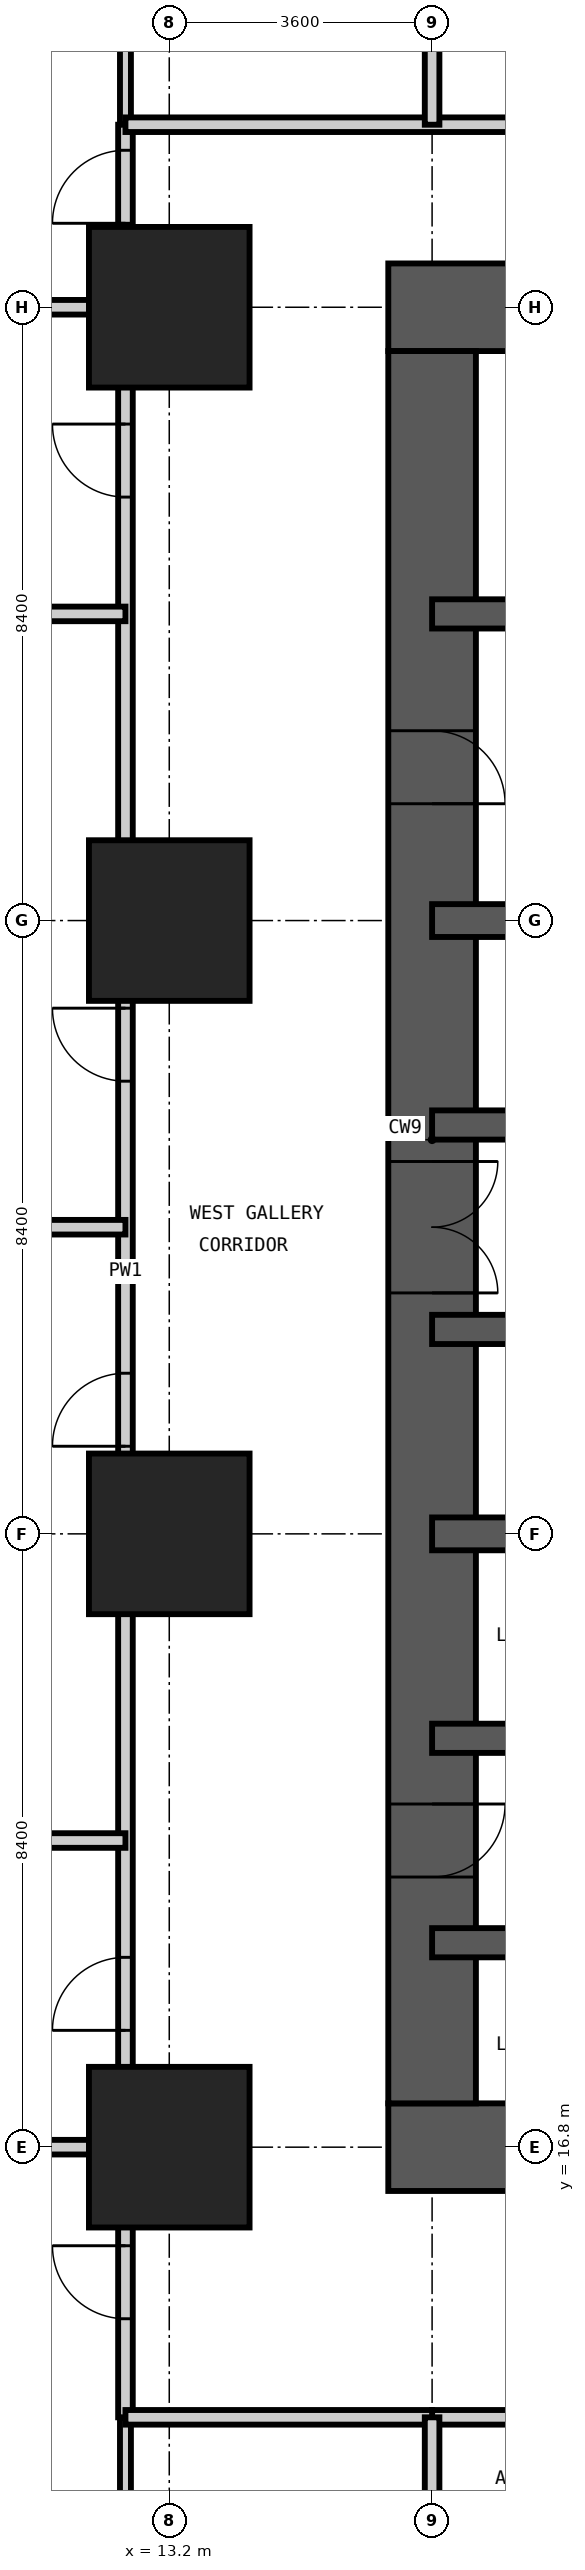
"""IFC4 building model, lengths in metres.
Left out: names, types, materials, properties, quantities, classifications, styles, units other than length and angle.
Written with IfcOpenShell. Run it as: python <this file> out.ifc"""

import sys

from ifc_helpers import new_model, si_unit, direction, frame, frame_2d, origin, origin_2d, place, context, subcontext, project, spatial, rectangle, extrude, element, fill, save


model = new_model("IFC4")
c1 = context("Model", 3, precision=1e-05, world=origin(), true_north=direction((0.0, 1.0)))
c2 = subcontext(c1, "Body", "Model", "MODEL_VIEW")
j1 = project(units=[si_unit("LENGTHUNIT", "METRE"), si_unit("PLANEANGLEUNIT", "RADIAN")], contexts=[c1])
p1 = place(None, origin())
s1 = spatial("IfcSite", under=j1, at=p1, CompositionType="ELEMENT")
p2 = place(p1, origin())
s2 = spatial("IfcBuilding", under=s1, at=p2, CompositionType="ELEMENT")
p3 = place(p2, frame((0.0, 0.0, 144.0)))
s3 = spatial("IfcBuildingStorey", under=s2, at=p3, CompositionType="ELEMENT", Elevation=144.0)
for number, where, z_axis, x_axis in (
    (1, (13.2, 16.8, -0.35), (0.0, 0.0, 1.0), (1.0, 0.0, 0.0)),
    (2, (13.2, 25.2, -0.35), (0.0, 0.0, 1.0), (1.0, 0.0, 0.0)),
    (3, (13.2, 33.6, -0.35), (0.0, 0.0, 1.0), (1.0, 0.0, 0.0)),
    (4, (13.2, 42.0, -0.35), (0.0, 0.0, 1.0), (1.0, 0.0, 0.0)),
):
    element("IfcColumn", number, at=place(p3, frame(where, z_axis=z_axis, x_axis=x_axis)), inside=s3, PredefinedType="COLUMN", context=c2, shape_type="SweptSolid", body=[
        extrude(rectangle(XDim=2.2, YDim=2.2, at=origin_2d()), origin(), (0.0, 0.0, 1.0), 3.6),
    ])
p4 = place(p3, frame((16.2, 16.8, -0.35), z_axis=(0.0, 0.0, 1.0), x_axis=(1.0, 0.0, 0.0)))
e5 = element("IfcWall", 5, at=p4, inside=s3, PredefinedType="SHEAR", context=c2, shape_type="SweptSolid", body=[
    extrude(rectangle(XDim=26.4, YDim=1.2, at=frame_2d((13.2, 0.0))), origin(), (0.0, 0.0, 1.0), 3.6),
])
p5 = place(p4, frame((12.7, 0.0, 0.35)))
e6 = element("IfcOpeningElement", 6, at=p5, cuts=e5, PredefinedType="OPENING", context=c2, shape_type="SweptSolid", body=[
    extrude(rectangle(XDim=1.0, YDim=2.1, at=frame_2d((0.5, 1.05))), frame((0.0, 0.61, 0.0), z_axis=(0.0, -1.0, 0.0), x_axis=(1.0, 0.0, 0.0)), (0.0, 0.0, 1.0), 1.22),
])
p6 = place(p4, frame((19.0, 0.0, 0.35)))
e7 = element("IfcOpeningElement", 7, at=p6, cuts=e5, PredefinedType="OPENING", context=c2, shape_type="SweptSolid", body=[
    extrude(rectangle(XDim=1.0, YDim=2.1, at=frame_2d((0.5, 1.05))), frame((0.0, 0.61, 0.0), z_axis=(0.0, -1.0, 0.0), x_axis=(1.0, 0.0, 0.0)), (0.0, 0.0, 1.0), 1.22),
])
p7 = place(p3, frame((42.6, 42.0, -0.35), z_axis=(0.0, 0.0, 1.0), x_axis=(-1.0, 0.0, 0.0)))
e8 = element("IfcWall", 8, at=p7, inside=s3, PredefinedType="SHEAR", context=c2, shape_type="SweptSolid", body=[
    extrude(rectangle(XDim=26.4, YDim=1.2, at=frame_2d((13.2, 0.0))), origin(), (0.0, 0.0, 1.0), 3.6),
])
p8 = place(p7, frame((21.1, 0.0, 0.35)))
e9 = element("IfcOpeningElement", 9, at=p8, cuts=e8, PredefinedType="OPENING", context=c2, shape_type="SweptSolid", body=[
    extrude(rectangle(XDim=1.0, YDim=2.1, at=frame_2d((0.5, 1.05))), frame((0.0, 0.61, 0.0), z_axis=(0.0, -1.0, 0.0), x_axis=(1.0, 0.0, 0.0)), (0.0, 0.0, 1.0), 1.22),
])
p9 = place(p7, frame((10.5, 0.0, 0.35)))
e10 = element("IfcOpeningElement", 10, at=p9, cuts=e8, PredefinedType="OPENING", context=c2, shape_type="SweptSolid", body=[
    extrude(rectangle(XDim=1.2, YDim=2.2, at=frame_2d((0.6, 1.1))), frame((0.0, 0.61, 0.0), z_axis=(0.0, -1.0, 0.0), x_axis=(1.0, 0.0, 0.0)), (0.0, 0.0, 1.0), 1.22),
])
p10 = place(p3, frame((16.8, 41.4, -0.35), z_axis=(0.0, 0.0, 1.0), x_axis=(0.0, -1.0, 0.0)))
e11 = element("IfcWall", 11, at=p10, inside=s3, PredefinedType="SHEAR", context=c2, shape_type="SweptSolid", body=[
    extrude(rectangle(XDim=24.0, YDim=1.2, at=frame_2d((12.0, 0.0))), origin(), (0.0, 0.0, 1.0), 3.6),
])
p11 = place(p10, frame((11.1, 0.0, 0.35)))
e12 = element("IfcOpeningElement", 12, at=p11, cuts=e11, PredefinedType="OPENING", context=c2, shape_type="SweptSolid", body=[
    extrude(rectangle(XDim=1.8, YDim=2.2, at=frame_2d((0.9, 1.1))), frame((0.0, 0.61, 0.0), z_axis=(0.0, -1.0, 0.0), x_axis=(1.0, 0.0, 0.0)), (0.0, 0.0, 1.0), 1.22),
])
p12 = place(p10, frame((19.9, 0.0, 0.35)))
e13 = element("IfcOpeningElement", 13, at=p12, cuts=e11, PredefinedType="OPENING", context=c2, shape_type="SweptSolid", body=[
    extrude(rectangle(XDim=1.0, YDim=2.1, at=frame_2d((0.5, 1.05))), frame((0.0, 0.61, 0.0), z_axis=(0.0, -1.0, 0.0), x_axis=(1.0, 0.0, 0.0)), (0.0, 0.0, 1.0), 1.22),
])
p13 = place(p10, frame((5.2, 0.0, 0.35)))
e14 = element("IfcOpeningElement", 14, at=p13, cuts=e11, PredefinedType="OPENING", context=c2, shape_type="SweptSolid", body=[
    extrude(rectangle(XDim=1.0, YDim=2.1, at=frame_2d((0.5, 1.05))), frame((0.0, 0.61, 0.0), z_axis=(0.0, -1.0, 0.0), x_axis=(1.0, 0.0, 0.0)), (0.0, 0.0, 1.0), 1.22),
])
for number, where, z_axis, x_axis in (
    (15, (16.8, 19.6, -0.35), (0.0, 0.0, 1.0), (1.0, 0.0, 0.0)),
    (16, (16.8, 22.4, -0.35), (0.0, 0.0, 1.0), (1.0, 0.0, 0.0)),
):
    element("IfcWall", number, at=place(p3, frame(where, z_axis=z_axis, x_axis=x_axis)), inside=s3, PredefinedType="SHEAR", context=c2, shape_type="SweptSolid", body=[
        extrude(rectangle(XDim=8.4, YDim=0.4, at=frame_2d((4.2, 0.0))), origin(), (0.0, 0.0, 1.0), 3.6),
    ])
p14 = place(p3, frame((16.8, 28.0, -0.35), z_axis=(0.0, 0.0, 1.0), x_axis=(1.0, 0.0, 0.0)))
e17 = element("IfcWall", 17, at=p14, inside=s3, PredefinedType="SHEAR", context=c2, shape_type="SweptSolid", body=[
    extrude(rectangle(XDim=8.4, YDim=0.4, at=frame_2d((4.2, 0.0))), origin(), (0.0, 0.0, 1.0), 3.6),
])
p15 = place(p14, frame((1.55, 0.0, 0.35)))
e18 = element("IfcOpeningElement", 18, at=p15, cuts=e17, PredefinedType="OPENING", context=c2, shape_type="SweptSolid", body=[
    extrude(rectangle(XDim=1.1, YDim=2.2, at=frame_2d((0.55, 1.1))), frame((0.0, 0.21, 0.0), z_axis=(0.0, -1.0, 0.0), x_axis=(1.0, 0.0, 0.0)), (0.0, 0.0, 1.0), 0.42),
])
p16 = place(p14, frame((5.75, 0.0, 0.35)))
e19 = element("IfcOpeningElement", 19, at=p16, cuts=e17, PredefinedType="OPENING", context=c2, shape_type="SweptSolid", body=[
    extrude(rectangle(XDim=1.1, YDim=2.2, at=frame_2d((0.55, 1.1))), frame((0.0, 0.21, 0.0), z_axis=(0.0, -1.0, 0.0), x_axis=(1.0, 0.0, 0.0)), (0.0, 0.0, 1.0), 0.42),
])
p17 = place(p3, frame((16.8, 30.8, -0.35), z_axis=(0.0, 0.0, 1.0), x_axis=(1.0, 0.0, 0.0)))
e20 = element("IfcWall", 20, at=p17, inside=s3, PredefinedType="SHEAR", context=c2, shape_type="SweptSolid", body=[
    extrude(rectangle(XDim=8.4, YDim=0.4, at=frame_2d((4.2, 0.0))), origin(), (0.0, 0.0, 1.0), 3.6),
])
p18 = place(p17, frame((1.55, 0.0, 0.35)))
e21 = element("IfcOpeningElement", 21, at=p18, cuts=e20, PredefinedType="OPENING", context=c2, shape_type="SweptSolid", body=[
    extrude(rectangle(XDim=1.1, YDim=2.2, at=frame_2d((0.55, 1.1))), frame((0.0, 0.21, 0.0), z_axis=(0.0, -1.0, 0.0), x_axis=(1.0, 0.0, 0.0)), (0.0, 0.0, 1.0), 0.42),
])
p19 = place(p17, frame((5.75, 0.0, 0.35)))
e22 = element("IfcOpeningElement", 22, at=p19, cuts=e20, PredefinedType="OPENING", context=c2, shape_type="SweptSolid", body=[
    extrude(rectangle(XDim=1.1, YDim=2.2, at=frame_2d((0.55, 1.1))), frame((0.0, 0.21, 0.0), z_axis=(0.0, -1.0, 0.0), x_axis=(1.0, 0.0, 0.0)), (0.0, 0.0, 1.0), 0.42),
])
p20 = place(p3, frame((16.8, 37.8, -0.35), z_axis=(0.0, 0.0, 1.0), x_axis=(1.0, 0.0, 0.0)))
e23 = element("IfcWall", 23, at=p20, inside=s3, PredefinedType="SHEAR", context=c2, shape_type="SweptSolid", body=[
    extrude(rectangle(XDim=8.4, YDim=0.4, at=frame_2d((4.2, 0.0))), origin(), (0.0, 0.0, 1.0), 3.6),
])
for number, where, z_axis, x_axis in (
    (24, (16.8, 25.2, -0.35), (0.0, 0.0, 1.0), (1.0, 0.0, 0.0)),
    (25, (16.8, 33.6, -0.35), (0.0, 0.0, 1.0), (1.0, 0.0, 0.0)),
):
    element("IfcWall", number, at=place(p3, frame(where, z_axis=z_axis, x_axis=x_axis)), inside=s3, PredefinedType="SHEAR", context=c2, shape_type="SweptSolid", body=[
        extrude(rectangle(XDim=25.2, YDim=0.45, at=frame_2d((12.6, 0.0))), origin(), (0.0, 0.0, 1.0), 3.6),
    ])
for number, where, z_axis, x_axis in (
    (26, (12.6, 10.1, 0.0), (0.0, 0.0, 1.0), (0.0, 1.0, 0.0)),
    (27, (12.6, 44.5, 0.0), (0.0, 0.0, 1.0), (0.0, 1.0, 0.0)),
):
    element("IfcWall", number, at=place(p3, frame(where, z_axis=z_axis, x_axis=x_axis)), inside=s3, PredefinedType="PARTITIONING", context=c2, shape_type="SweptSolid", body=[
        extrude(rectangle(XDim=3.0, YDim=0.15, at=frame_2d((1.5, 0.0))), origin(), (0.0, 0.0, 1.0), 3.25),
    ])
p21 = place(p3, frame((12.6, 13.1, 0.0), z_axis=(0.0, 0.0, 1.0), x_axis=(0.0, 1.0, 0.0)))
e28 = element("IfcWall", 28, at=p21, inside=s3, PredefinedType="PARTITIONING", context=c2, shape_type="SweptSolid", body=[
    extrude(rectangle(XDim=31.4, YDim=0.2, at=frame_2d((15.7, 0.0))), origin(), (0.0, 0.0, 1.0), 3.25),
])
p22 = place(p21, frame((5.3, 0.0, 0.0)))
e29 = element("IfcOpeningElement", 29, at=p22, cuts=e28, PredefinedType="OPENING", context=c2, shape_type="SweptSolid", body=[
    extrude(rectangle(XDim=1.0, YDim=2.2, at=frame_2d((0.5, 1.1))), frame((0.0, 0.11, 0.0), z_axis=(0.0, -1.0, 0.0), x_axis=(1.0, 0.0, 0.0)), (0.0, 0.0, 1.0), 0.22),
])
p23 = place(p21, frame((13.3, 0.0, 0.0)))
e30 = element("IfcOpeningElement", 30, at=p23, cuts=e28, PredefinedType="OPENING", context=c2, shape_type="SweptSolid", body=[
    extrude(rectangle(XDim=1.0, YDim=2.2, at=frame_2d((0.5, 1.1))), frame((0.0, 0.11, 0.0), z_axis=(0.0, -1.0, 0.0), x_axis=(1.0, 0.0, 0.0)), (0.0, 0.0, 1.0), 0.22),
])
p24 = place(p21, frame((18.3, 0.0, 0.0)))
e31 = element("IfcOpeningElement", 31, at=p24, cuts=e28, PredefinedType="OPENING", context=c2, shape_type="SweptSolid", body=[
    extrude(rectangle(XDim=1.0, YDim=2.2, at=frame_2d((0.5, 1.1))), frame((0.0, 0.11, 0.0), z_axis=(0.0, -1.0, 0.0), x_axis=(1.0, 0.0, 0.0)), (0.0, 0.0, 1.0), 0.22),
])
p25 = place(p21, frame((26.3, 0.0, 0.0)))
e32 = element("IfcOpeningElement", 32, at=p25, cuts=e28, PredefinedType="OPENING", context=c2, shape_type="SweptSolid", body=[
    extrude(rectangle(XDim=1.0, YDim=2.2, at=frame_2d((0.5, 1.1))), frame((0.0, 0.11, 0.0), z_axis=(0.0, -1.0, 0.0), x_axis=(1.0, 0.0, 0.0)), (0.0, 0.0, 1.0), 0.22),
])
p26 = place(p21, frame((1.35, 0.0, 0.0)))
e33 = element("IfcOpeningElement", 33, at=p26, cuts=e28, PredefinedType="OPENING", context=c2, shape_type="SweptSolid", body=[
    extrude(rectangle(XDim=1.0, YDim=2.2, at=frame_2d((0.5, 1.1))), frame((0.0, 0.11, 0.0), z_axis=(0.0, -1.0, 0.0), x_axis=(1.0, 0.0, 0.0)), (0.0, 0.0, 1.0), 0.22),
])
p27 = place(p21, frame((30.05, 0.0, 0.0)))
e34 = element("IfcOpeningElement", 34, at=p27, cuts=e28, PredefinedType="OPENING", context=c2, shape_type="SweptSolid", body=[
    extrude(rectangle(XDim=1.0, YDim=2.2, at=frame_2d((0.5, 1.1))), frame((0.0, 0.11, 0.0), z_axis=(0.0, -1.0, 0.0), x_axis=(1.0, 0.0, 0.0)), (0.0, 0.0, 1.0), 0.22),
])
p28 = place(p3, frame((16.8, 13.1, 0.0), z_axis=(0.0, 0.0, 1.0), x_axis=(1.0, 0.0, 0.0)))
e35 = element("IfcWall", 35, at=p28, inside=s3, PredefinedType="PARTITIONING", context=c2, shape_type="SweptSolid", body=[
    extrude(rectangle(XDim=4.2, YDim=0.2, at=frame_2d((2.1, 0.0))), origin(), (0.0, 0.0, 1.0), 3.25),
])
p29 = place(p28, frame((2.8, 0.0, 0.0)))
e36 = element("IfcOpeningElement", 36, at=p29, cuts=e35, PredefinedType="OPENING", context=c2, shape_type="SweptSolid", body=[
    extrude(rectangle(XDim=1.0, YDim=2.2, at=frame_2d((0.5, 1.1))), frame((0.0, 0.11, 0.0), z_axis=(0.0, -1.0, 0.0), x_axis=(1.0, 0.0, 0.0)), (0.0, 0.0, 1.0), 0.22),
])
p30 = place(p3, frame((12.6, 44.5, 0.0), z_axis=(0.0, 0.0, 1.0), x_axis=(1.0, 0.0, 0.0)))
e37 = element("IfcWall", 37, at=p30, inside=s3, PredefinedType="PARTITIONING", context=c2, shape_type="SweptSolid", body=[
    extrude(rectangle(XDim=32.5, YDim=0.2, at=frame_2d((16.25, 0.0))), origin(), (0.0, 0.0, 1.0), 3.25),
])
p31 = place(p30, frame((5.8, 0.0, 0.0)))
e38 = element("IfcOpeningElement", 38, at=p31, cuts=e37, PredefinedType="OPENING", context=c2, shape_type="SweptSolid", body=[
    extrude(rectangle(XDim=1.0, YDim=2.2, at=frame_2d((0.5, 1.1))), frame((0.0, 0.11, 0.0), z_axis=(0.0, -1.0, 0.0), x_axis=(1.0, 0.0, 0.0)), (0.0, 0.0, 1.0), 0.22),
])
p32 = place(p30, frame((12.1, 0.0, 0.0)))
e39 = element("IfcOpeningElement", 39, at=p32, cuts=e37, PredefinedType="OPENING", context=c2, shape_type="SweptSolid", body=[
    extrude(rectangle(XDim=1.0, YDim=2.2, at=frame_2d((0.5, 1.1))), frame((0.0, 0.11, 0.0), z_axis=(0.0, -1.0, 0.0), x_axis=(1.0, 0.0, 0.0)), (0.0, 0.0, 1.0), 0.22),
])
p33 = place(p30, frame((20.5, 0.0, 0.0)))
e40 = element("IfcOpeningElement", 40, at=p33, cuts=e37, PredefinedType="OPENING", context=c2, shape_type="SweptSolid", body=[
    extrude(rectangle(XDim=1.0, YDim=2.2, at=frame_2d((0.5, 1.1))), frame((0.0, 0.11, 0.0), z_axis=(0.0, -1.0, 0.0), x_axis=(1.0, 0.0, 0.0)), (0.0, 0.0, 1.0), 0.22),
])
p34 = place(p30, frame((26.8, 0.0, 0.0)))
e41 = element("IfcOpeningElement", 41, at=p34, cuts=e37, PredefinedType="OPENING", context=c2, shape_type="SweptSolid", body=[
    extrude(rectangle(XDim=1.0, YDim=2.2, at=frame_2d((0.5, 1.1))), frame((0.0, 0.11, 0.0), z_axis=(0.0, -1.0, 0.0), x_axis=(1.0, 0.0, 0.0)), (0.0, 0.0, 1.0), 0.22),
])
p35 = place(p3, frame((16.8, 13.1, 0.0), z_axis=(0.0, 0.0, 1.0), x_axis=(-1.0, 0.0, 0.0)))
e42 = element("IfcWall", 42, at=p35, inside=s3, PredefinedType="PARTITIONING", context=c2, shape_type="SweptSolid", body=[
    extrude(rectangle(XDim=4.2, YDim=0.2, at=frame_2d((2.1, 0.0))), origin(), (0.0, 0.0, 1.0), 3.25),
])
p36 = place(p3, frame((16.8, -0.018, 0.0), z_axis=(0.0, 0.0, 1.0), x_axis=(0.0, 1.0, 0.0)))
e43 = element("IfcWall", 43, at=p36, inside=s3, PredefinedType="PARTITIONING", context=c2, shape_type="SweptSolid", body=[
    extrude(rectangle(XDim=13.118, YDim=0.2, at=frame_2d((6.559, 0.0))), origin(), (0.0, 0.0, 1.0), 3.25),
])
p37 = place(p3, frame((16.8, 44.5, 0.0), z_axis=(0.0, 0.0, 1.0), x_axis=(0.0, 1.0, 0.0)))
e44 = element("IfcWall", 44, at=p37, inside=s3, PredefinedType="PARTITIONING", context=c2, shape_type="SweptSolid", body=[
    extrude(rectangle(XDim=10.118, YDim=0.2, at=frame_2d((5.059, 0.0))), origin(), (0.0, 0.0, 1.0), 3.25),
])
for number, where, z_axis, x_axis in (
    (45, (-0.018, 16.8, 0.0), (0.0, 0.0, 1.0), (1.0, 0.0, 0.0)),
    (46, (-0.018, 21.0, 0.0), (0.0, 0.0, 1.0), (1.0, 0.0, 0.0)),
    (47, (-0.018, 29.4, 0.0), (0.0, 0.0, 1.0), (1.0, 0.0, 0.0)),
    (48, (-0.018, 37.8, 0.0), (0.0, 0.0, 1.0), (1.0, 0.0, 0.0)),
    (49, (-0.018, 42.0, 0.0), (0.0, 0.0, 1.0), (1.0, 0.0, 0.0)),
):
    element("IfcWall", number, at=place(p3, frame(where, z_axis=z_axis, x_axis=x_axis)), inside=s3, PredefinedType="PARTITIONING", context=c2, shape_type="SweptSolid", body=[
        extrude(rectangle(XDim=12.618, YDim=0.2, at=frame_2d((6.309, 0.0))), origin(), (0.0, 0.0, 1.0), 3.25),
    ])
p38 = place(p22, origin())
e50 = element("IfcDoor", 50, at=p38, inside=s3, OperationType="SINGLE_SWING_LEFT", PredefinedType="DOOR", context=c2, shape_type="SweptSolid", body=[
    extrude(rectangle(XDim=1.0, YDim=2.2, at=frame_2d((0.5, 1.1))), frame((0.0, 0.025, 0.0), z_axis=(0.0, -1.0, 0.0), x_axis=(1.0, 0.0, 0.0)), (0.0, 0.0, 1.0), 0.05),
])
fill(e29, e50)
p39 = place(p23, origin())
e51 = element("IfcDoor", 51, at=p39, inside=s3, OperationType="SINGLE_SWING_LEFT", PredefinedType="DOOR", context=c2, shape_type="SweptSolid", body=[
    extrude(rectangle(XDim=1.0, YDim=2.2, at=frame_2d((0.5, 1.1))), frame((0.0, 0.025, 0.0), z_axis=(0.0, -1.0, 0.0), x_axis=(1.0, 0.0, 0.0)), (0.0, 0.0, 1.0), 0.05),
])
fill(e30, e51)
p40 = place(p24, origin())
e52 = element("IfcDoor", 52, at=p40, inside=s3, OperationType="SINGLE_SWING_RIGHT", PredefinedType="DOOR", context=c2, shape_type="SweptSolid", body=[
    extrude(rectangle(XDim=1.0, YDim=2.2, at=frame_2d((0.5, 1.1))), frame((0.0, 0.025, 0.0), z_axis=(0.0, -1.0, 0.0), x_axis=(1.0, 0.0, 0.0)), (0.0, 0.0, 1.0), 0.05),
])
fill(e31, e52)
p41 = place(p25, origin())
e53 = element("IfcDoor", 53, at=p41, inside=s3, OperationType="SINGLE_SWING_RIGHT", PredefinedType="DOOR", context=c2, shape_type="SweptSolid", body=[
    extrude(rectangle(XDim=1.0, YDim=2.2, at=frame_2d((0.5, 1.1))), frame((0.0, 0.025, 0.0), z_axis=(0.0, -1.0, 0.0), x_axis=(1.0, 0.0, 0.0)), (0.0, 0.0, 1.0), 0.05),
])
fill(e32, e53)
p42 = place(p26, origin())
e54 = element("IfcDoor", 54, at=p42, inside=s3, OperationType="SINGLE_SWING_RIGHT", PredefinedType="DOOR", context=c2, shape_type="SweptSolid", body=[
    extrude(rectangle(XDim=1.0, YDim=2.2, at=frame_2d((0.5, 1.1))), frame((0.0, 0.025, 0.0), z_axis=(0.0, -1.0, 0.0), x_axis=(1.0, 0.0, 0.0)), (0.0, 0.0, 1.0), 0.05),
])
fill(e33, e54)
p43 = place(p27, origin())
e55 = element("IfcDoor", 55, at=p43, inside=s3, OperationType="SINGLE_SWING_LEFT", PredefinedType="DOOR", context=c2, shape_type="SweptSolid", body=[
    extrude(rectangle(XDim=1.0, YDim=2.2, at=frame_2d((0.5, 1.1))), frame((0.0, 0.025, 0.0), z_axis=(0.0, -1.0, 0.0), x_axis=(1.0, 0.0, 0.0)), (0.0, 0.0, 1.0), 0.05),
])
fill(e34, e55)
p44 = place(p11, origin())
e56 = element("IfcDoor", 56, at=p44, inside=s3, OperationType="DOUBLE_DOOR_DOUBLE_SWING", PredefinedType="DOOR", context=c2, shape_type="SweptSolid", body=[
    extrude(rectangle(XDim=1.8, YDim=2.2, at=frame_2d((0.9, 1.1))), frame((0.0, 0.025, 0.0), z_axis=(0.0, -1.0, 0.0), x_axis=(1.0, 0.0, 0.0)), (0.0, 0.0, 1.0), 0.05),
])
fill(e12, e56)
p45 = place(p12, origin())
e57 = element("IfcDoor", 57, at=p45, inside=s3, OperationType="SINGLE_SWING_LEFT", PredefinedType="DOOR", context=c2, shape_type="SweptSolid", body=[
    extrude(rectangle(XDim=1.0, YDim=2.1, at=frame_2d((0.5, 1.05))), frame((0.0, 0.025, 0.0), z_axis=(0.0, -1.0, 0.0), x_axis=(1.0, 0.0, 0.0)), (0.0, 0.0, 1.0), 0.05),
])
fill(e13, e57)
p46 = place(p13, origin())
e58 = element("IfcDoor", 58, at=p46, inside=s3, OperationType="SINGLE_SWING_RIGHT", PredefinedType="DOOR", context=c2, shape_type="SweptSolid", body=[
    extrude(rectangle(XDim=1.0, YDim=2.1, at=frame_2d((0.5, 1.05))), frame((0.0, 0.025, 0.0), z_axis=(0.0, -1.0, 0.0), x_axis=(1.0, 0.0, 0.0)), (0.0, 0.0, 1.0), 0.05),
])
fill(e14, e58)
save(model, sys.argv[1])
